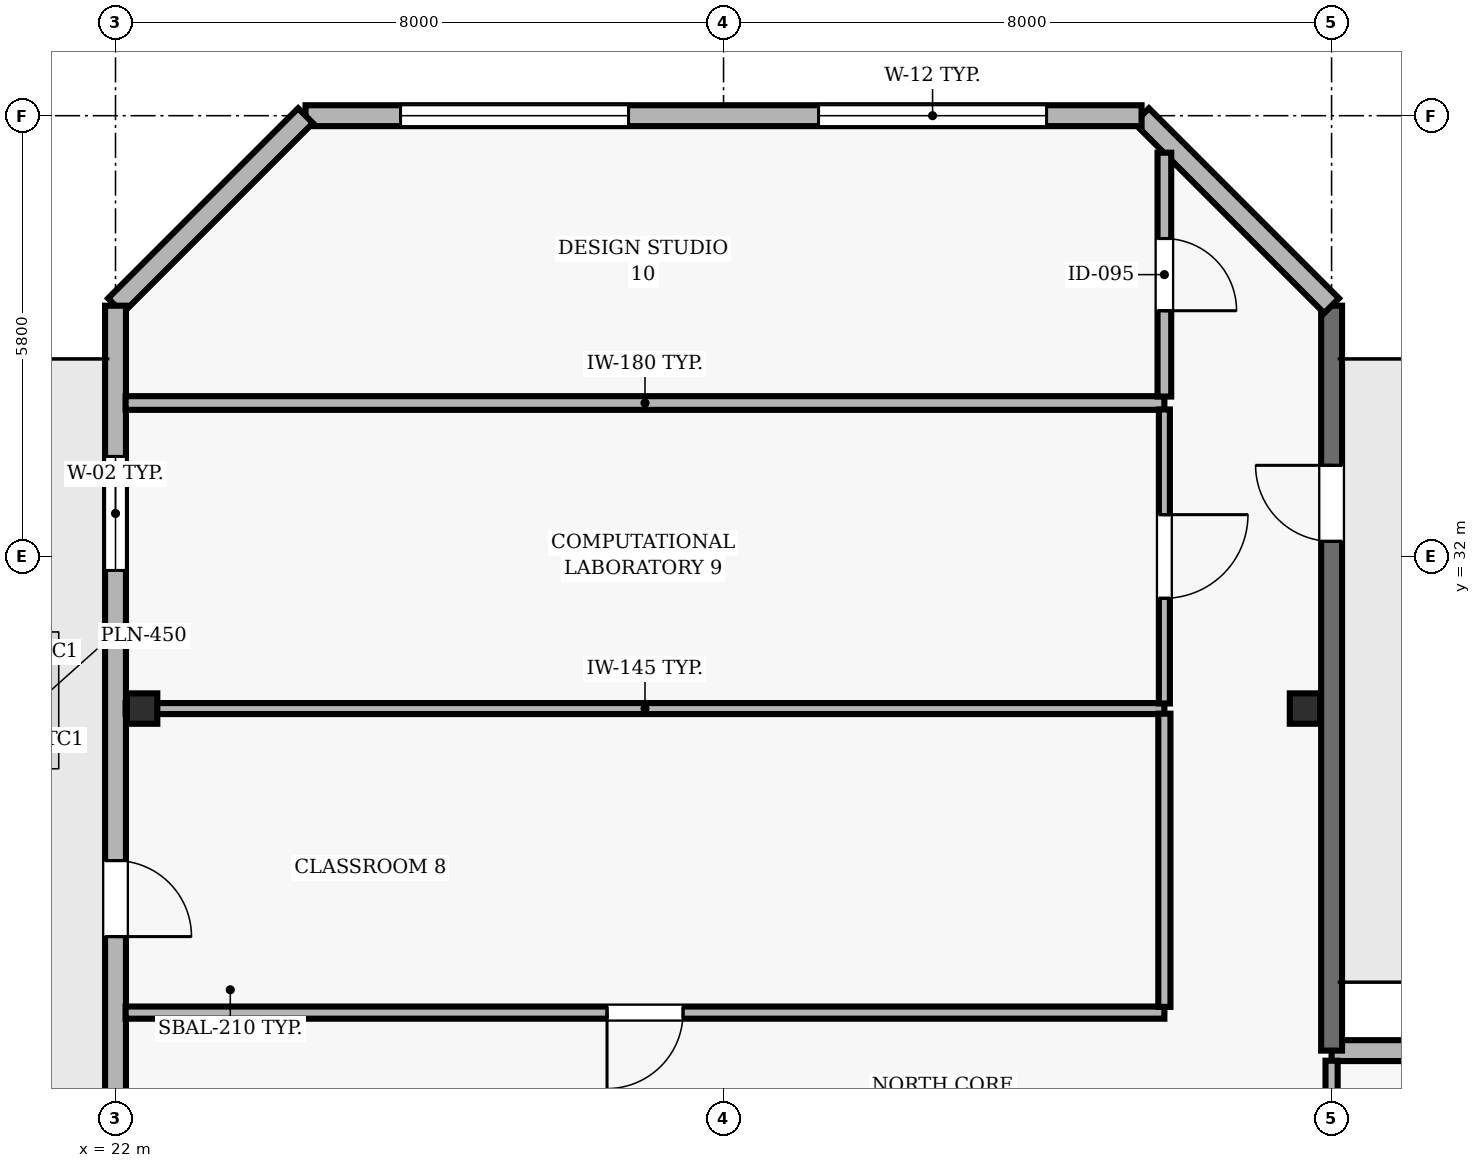
"""IFC4 building model, lengths in metres.
Left out: names, types, materials, properties, quantities, classifications, styles, units other than length and angle.
Written with IfcOpenShell. Run it as: python <this file> out.ifc"""

import sys

from ifc_helpers import new_model, si_unit, direction, frame, frame_2d, origin, origin_2d, place, context, subcontext, project, spatial, rectangle, hollow_rectangle, extrude, element, fill, save


model = new_model("IFC4")
c1 = context("Model", 3, precision=1e-05, world=origin(), true_north=direction((0.0, 1.0)))
c2 = subcontext(c1, "Body", "Model", "MODEL_VIEW")
j1 = project(units=[si_unit("LENGTHUNIT", "METRE"), si_unit("PLANEANGLEUNIT", "RADIAN")], contexts=[c1])
p1 = place(None, origin())
s1 = spatial("IfcSite", under=j1, at=p1, CompositionType="ELEMENT")
p2 = place(p1, origin())
s2 = spatial("IfcBuilding", under=s1, at=p2, CompositionType="ELEMENT")
p3 = place(p2, frame((0.0, 0.0, 252.1)))
s3 = spatial("IfcBuildingStorey", under=s2, at=p3, CompositionType="ELEMENT", Elevation=252.1)
for number, where, z_axis, x_axis in (
    (1, (22.35, 30.0, 0.0), (0.0, 0.0, 1.0), (1.0, 0.0, 0.0)),
    (2, (37.65, 30.0, 0.0), (0.0, 0.0, 1.0), (1.0, 0.0, 0.0)),
):
    element("IfcColumn", number, at=place(p3, frame(where, z_axis=z_axis, x_axis=x_axis)), inside=s3, PredefinedType="COLUMN", context=c2, shape_type="SweptSolid", body=[
        extrude(hollow_rectangle(XDim=0.4, YDim=0.4, WallThickness=0.02, at=origin_2d()), origin(), (0.0, 0.0, 1.0), 3.9),
    ])
p4 = place(p3, frame((43.64, 25.5, 0.0), z_axis=(0.0, 0.0, 1.0), x_axis=(-1.0, 0.0, 0.0)))
e3 = element("IfcWall", 3, at=p4, inside=s3, PredefinedType="SOLIDWALL", context=c2, shape_type="SweptSolid", body=[
    extrude(rectangle(XDim=5.64, YDim=0.275, at=frame_2d((2.82, 0.0))), origin(), (0.0, 0.0, 1.0), 3.69),
])
p5 = place(p4, frame((1.42, 0.0, 0.9)))
e4 = element("IfcOpeningElement", 4, at=p5, cuts=e3, PredefinedType="OPENING", context=c2, shape_type="SweptSolid", body=[
    extrude(rectangle(XDim=2.8, YDim=1.8, at=frame_2d((1.4, 0.9))), frame((0.0, 0.147, 0.0), z_axis=(0.0, -1.0, 0.0), x_axis=(1.0, 0.0, 0.0)), (0.0, 0.0, 1.0), 0.295),
])
p6 = place(p3, frame((38.0, 25.5, 0.0), z_axis=(0.0, 0.0, 1.0), x_axis=(0.0, 1.0, 0.0)))
e5 = element("IfcWall", 5, at=p6, inside=s3, PredefinedType="SOLIDWALL", context=c2, shape_type="SweptSolid", body=[
    extrude(rectangle(XDim=9.8, YDim=0.275, at=frame_2d((4.9, 0.0))), origin(), (0.0, 0.0, 1.0), 3.69),
])
p7 = place(p6, frame((6.7, 0.0, 0.0)))
e6 = element("IfcOpeningElement", 6, at=p7, cuts=e5, PredefinedType="OPENING", context=c2, shape_type="SweptSolid", body=[
    extrude(rectangle(XDim=1.0, YDim=2.2, at=frame_2d((0.5, 1.1))), frame((0.0, 0.147, 0.0), z_axis=(0.0, -1.0, 0.0), x_axis=(1.0, 0.0, 0.0)), (0.0, 0.0, 1.0), 0.295),
])
p8 = place(p3, frame((38.0, 35.3, 0.0), z_axis=(0.0, 0.0, 1.0), x_axis=(-0.707106781187, 0.707106781187, 0.0)))
e7 = element("IfcWall", 7, at=p8, inside=s3, PredefinedType="SOLIDWALL", context=c2, shape_type="SweptSolid", body=[
    extrude(rectangle(XDim=3.536, YDim=0.275, at=frame_2d((1.768, 0.0))), origin(), (0.0, 0.0, 1.0), 3.69),
])
p9 = place(p3, frame((35.5, 37.8, 0.0), z_axis=(0.0, 0.0, 1.0), x_axis=(-1.0, 0.0, 0.0)))
e8 = element("IfcWall", 8, at=p9, inside=s3, PredefinedType="SOLIDWALL", context=c2, shape_type="SweptSolid", body=[
    extrude(rectangle(XDim=11.0, YDim=0.275, at=frame_2d((5.5, 0.0))), origin(), (0.0, 0.0, 1.0), 3.69),
])
p10 = place(p9, frame((1.25, 0.0, 0.9)))
e9 = element("IfcOpeningElement", 9, at=p10, cuts=e8, PredefinedType="OPENING", context=c2, shape_type="SweptSolid", body=[
    extrude(rectangle(XDim=3.0, YDim=2.2, at=frame_2d((1.5, 1.1))), frame((0.0, 0.147, 0.0), z_axis=(0.0, -1.0, 0.0), x_axis=(1.0, 0.0, 0.0)), (0.0, 0.0, 1.0), 0.295),
])
p11 = place(p9, frame((6.75, 0.0, 0.9)))
e10 = element("IfcOpeningElement", 10, at=p11, cuts=e8, PredefinedType="OPENING", context=c2, shape_type="SweptSolid", body=[
    extrude(rectangle(XDim=3.0, YDim=2.2, at=frame_2d((1.5, 1.1))), frame((0.0, 0.147, 0.0), z_axis=(0.0, -1.0, 0.0), x_axis=(1.0, 0.0, 0.0)), (0.0, 0.0, 1.0), 0.295),
])
p12 = place(p3, frame((24.5, 37.8, 0.0), z_axis=(0.0, 0.0, 1.0), x_axis=(-0.707106781187, -0.707106781187, 0.0)))
e11 = element("IfcWall", 11, at=p12, inside=s3, PredefinedType="SOLIDWALL", context=c2, shape_type="SweptSolid", body=[
    extrude(rectangle(XDim=3.536, YDim=0.275, at=frame_2d((1.768, 0.0))), origin(), (0.0, 0.0, 1.0), 3.69),
])
p13 = place(p3, frame((22.0, 35.3, 0.0), z_axis=(0.0, 0.0, 1.0), x_axis=(0.0, -1.0, 0.0)))
e12 = element("IfcWall", 12, at=p13, inside=s3, PredefinedType="SOLIDWALL", context=c2, shape_type="SweptSolid", body=[
    extrude(rectangle(XDim=32.8, YDim=0.275, at=frame_2d((16.4, 0.0))), origin(), (0.0, 0.0, 1.0), 3.69),
])
p14 = place(p13, frame((7.3, 0.0, 0.0)))
e13 = element("IfcOpeningElement", 13, at=p14, cuts=e12, PredefinedType="OPENING", context=c2, shape_type="SweptSolid", body=[
    extrude(rectangle(XDim=1.0, YDim=2.2, at=frame_2d((0.5, 1.1))), frame((0.0, 0.147, 0.0), z_axis=(0.0, -1.0, 0.0), x_axis=(1.0, 0.0, 0.0)), (0.0, 0.0, 1.0), 0.295),
])
p15 = place(p13, frame((1.983, 0.0, 0.9)))
e14 = element("IfcOpeningElement", 14, at=p15, cuts=e12, PredefinedType="OPENING", context=c2, shape_type="SweptSolid", body=[
    extrude(rectangle(XDim=1.5, YDim=1.6, at=frame_2d((0.75, 0.8))), frame((0.0, 0.147, 0.0), z_axis=(0.0, -1.0, 0.0), x_axis=(1.0, 0.0, 0.0)), (0.0, 0.0, 1.0), 0.295),
])
p16 = place(p13, frame((12.917, 0.0, 0.9)))
e15 = element("IfcOpeningElement", 15, at=p16, cuts=e12, PredefinedType="OPENING", context=c2, shape_type="SweptSolid", body=[
    extrude(rectangle(XDim=1.5, YDim=1.6, at=frame_2d((0.75, 0.8))), frame((0.0, 0.147, 0.0), z_axis=(0.0, -1.0, 0.0), x_axis=(1.0, 0.0, 0.0)), (0.0, 0.0, 1.0), 0.295),
])
p17 = place(p13, frame((18.383, 0.0, 0.9)))
e16 = element("IfcOpeningElement", 16, at=p17, cuts=e12, PredefinedType="OPENING", context=c2, shape_type="SweptSolid", body=[
    extrude(rectangle(XDim=1.5, YDim=1.6, at=frame_2d((0.75, 0.8))), frame((0.0, 0.147, 0.0), z_axis=(0.0, -1.0, 0.0), x_axis=(1.0, 0.0, 0.0)), (0.0, 0.0, 1.0), 0.295),
])
p18 = place(p13, frame((23.85, 0.0, 0.9)))
e17 = element("IfcOpeningElement", 17, at=p18, cuts=e12, PredefinedType="OPENING", context=c2, shape_type="SweptSolid", body=[
    extrude(rectangle(XDim=1.5, YDim=1.6, at=frame_2d((0.75, 0.8))), frame((0.0, 0.147, 0.0), z_axis=(0.0, -1.0, 0.0), x_axis=(1.0, 0.0, 0.0)), (0.0, 0.0, 1.0), 0.295),
])
p19 = place(p3, frame((35.8, 26.0, 0.0), z_axis=(0.0, 0.0, 1.0), x_axis=(-1.0, 0.0, 0.0)))
e18 = element("IfcWall", 18, at=p19, inside=s3, PredefinedType="PARTITIONING", context=c2, shape_type="SweptSolid", body=[
    extrude(rectangle(XDim=13.667, YDim=0.16, at=frame_2d((6.833, 0.0))), origin(), (0.0, 0.0, 1.0), 3.69),
])
p20 = place(p19, frame((6.333, 0.0, 0.0)))
e19 = element("IfcOpeningElement", 19, at=p20, cuts=e18, PredefinedType="OPENING", context=c2, shape_type="SweptSolid", body=[
    extrude(rectangle(XDim=1.0, YDim=2.1, at=frame_2d((0.5, 1.05))), frame((0.0, 0.09, 0.0), z_axis=(0.0, -1.0, 0.0), x_axis=(1.0, 0.0, 0.0)), (0.0, 0.0, 1.0), 0.18),
])
p21 = place(p3, frame((35.8, 30.0, 0.0), z_axis=(0.0, 0.0, 1.0), x_axis=(-1.0, 0.0, 0.0)))
e20 = element("IfcWall", 20, at=p21, inside=s3, PredefinedType="PARTITIONING", context=c2, shape_type="SweptSolid", body=[
    extrude(rectangle(XDim=13.667, YDim=0.145, at=frame_2d((6.833, 0.0))), origin(), (0.0, 0.0, 1.0), 3.227),
])
p22 = place(p3, frame((35.8, 34.02, 0.0), z_axis=(0.0, 0.0, 1.0), x_axis=(-1.0, 0.0, 0.0)))
e21 = element("IfcWall", 21, at=p22, inside=s3, PredefinedType="PARTITIONING", context=c2, shape_type="SweptSolid", body=[
    extrude(rectangle(XDim=13.667, YDim=0.18, at=frame_2d((6.833, 0.0))), origin(), (0.0, 0.0, 1.0), 3.69),
])
p23 = place(p3, frame((35.8, 29.933, 0.0), z_axis=(0.0, 0.0, 1.0), x_axis=(0.0, -1.0, 0.0)))
e22 = element("IfcWall", 22, at=p23, inside=s3, PredefinedType="PARTITIONING", context=c2, shape_type="SweptSolid", body=[
    extrude(rectangle(XDim=3.858, YDim=0.16, at=frame_2d((1.929, 0.0))), origin(), (0.0, 0.0, 1.0), 3.69),
])
p24 = place(p3, frame((35.8, 33.935, 0.0), z_axis=(0.0, 0.0, 1.0), x_axis=(0.0, -1.0, 0.0)))
e23 = element("IfcWall", 23, at=p24, inside=s3, PredefinedType="PARTITIONING", context=c2, shape_type="SweptSolid", body=[
    extrude(rectangle(XDim=3.868, YDim=0.145, at=frame_2d((1.934, 0.0))), origin(), (0.0, 0.0, 1.0), 3.69),
])
p25 = place(p24, frame((1.384, 0.0, 0.0)))
e24 = element("IfcOpeningElement", 24, at=p25, cuts=e23, PredefinedType="OPENING", context=c2, shape_type="SweptSolid", body=[
    extrude(rectangle(XDim=1.1, YDim=2.15, at=frame_2d((0.55, 1.075))), frame((0.0, 0.083, 0.0), z_axis=(0.0, -1.0, 0.0), x_axis=(1.0, 0.0, 0.0)), (0.0, 0.0, 1.0), 0.165),
])
p26 = place(p3, frame((35.8, 37.313, 0.0), z_axis=(0.0, 0.0, 1.0), x_axis=(0.0, -1.0, 0.0)))
e25 = element("IfcWall", 25, at=p26, inside=s3, PredefinedType="PARTITIONING", context=c2, shape_type="SweptSolid", body=[
    extrude(rectangle(XDim=3.208, YDim=0.18, at=frame_2d((1.604, 0.0))), origin(), (0.0, 0.0, 1.0), 3.69),
])
p27 = place(p26, frame((1.129, 0.0, 0.0)))
e26 = element("IfcOpeningElement", 26, at=p27, cuts=e25, PredefinedType="OPENING", context=c2, shape_type="SweptSolid", body=[
    extrude(rectangle(XDim=0.95, YDim=2.1, at=frame_2d((0.475, 1.05))), frame((0.0, 0.1, 0.0), z_axis=(0.0, -1.0, 0.0), x_axis=(1.0, 0.0, 0.0)), (0.0, 0.0, 1.0), 0.2),
])
p28 = place(p3, frame((38.0, 23.85, 0.0), z_axis=(0.0, 0.0, 1.0), x_axis=(0.0, 1.0, 0.0)))
e27 = element("IfcWall", 27, at=p28, inside=s3, PredefinedType="PARTITIONING", context=c2, shape_type="SweptSolid", body=[
    extrude(rectangle(XDim=1.517, YDim=0.16, at=frame_2d((0.758, 0.0))), origin(), (0.0, 0.0, 1.0), 3.227),
])
p29 = place(p7, origin())
e28 = element("IfcDoor", 28, at=p29, inside=s3, OperationType="SINGLE_SWING_RIGHT", PredefinedType="DOOR", context=c2, shape_type="SweptSolid", body=[
    extrude(rectangle(XDim=1.0, YDim=2.2, at=frame_2d((0.5, 1.1))), frame((0.0, 0.025, 0.0), z_axis=(0.0, -1.0, 0.0), x_axis=(1.0, 0.0, 0.0)), (0.0, 0.0, 1.0), 0.05),
])
fill(e6, e28)
p30 = place(p10, origin())
e29 = element("IfcWindow", 29, at=p30, inside=s3, PartitioningType="SINGLE_PANEL", PredefinedType="WINDOW", context=c2, shape_type="SweptSolid", body=[
    extrude(rectangle(XDim=3.0, YDim=2.2, at=frame_2d((1.5, 1.1))), frame((0.0, 0.03, 0.0), z_axis=(0.0, -1.0, 0.0), x_axis=(1.0, 0.0, 0.0)), (0.0, 0.0, 1.0), 0.06),
])
fill(e9, e29)
p31 = place(p11, origin())
e30 = element("IfcWindow", 30, at=p31, inside=s3, PartitioningType="SINGLE_PANEL", PredefinedType="WINDOW", context=c2, shape_type="SweptSolid", body=[
    extrude(rectangle(XDim=3.0, YDim=2.2, at=frame_2d((1.5, 1.1))), frame((0.0, 0.03, 0.0), z_axis=(0.0, -1.0, 0.0), x_axis=(1.0, 0.0, 0.0)), (0.0, 0.0, 1.0), 0.06),
])
fill(e10, e30)
p32 = place(p14, origin())
e31 = element("IfcDoor", 31, at=p32, inside=s3, OperationType="SINGLE_SWING_RIGHT", PredefinedType="DOOR", context=c2, shape_type="SweptSolid", body=[
    extrude(rectangle(XDim=1.0, YDim=2.2, at=frame_2d((0.5, 1.1))), frame((0.0, 0.025, 0.0), z_axis=(0.0, -1.0, 0.0), x_axis=(1.0, 0.0, 0.0)), (0.0, 0.0, 1.0), 0.05),
])
fill(e13, e31)
p33 = place(p15, origin())
e32 = element("IfcWindow", 32, at=p33, inside=s3, PartitioningType="SINGLE_PANEL", PredefinedType="WINDOW", context=c2, shape_type="SweptSolid", body=[
    extrude(rectangle(XDim=1.5, YDim=1.6, at=frame_2d((0.75, 0.8))), frame((0.0, 0.03, 0.0), z_axis=(0.0, -1.0, 0.0), x_axis=(1.0, 0.0, 0.0)), (0.0, 0.0, 1.0), 0.06),
])
fill(e14, e32)
p34 = place(p20, origin())
e33 = element("IfcDoor", 33, at=p34, inside=s3, OperationType="SINGLE_SWING_RIGHT", PredefinedType="DOOR", context=c2, shape_type="SweptSolid", body=[
    extrude(rectangle(XDim=1.0, YDim=2.1, at=frame_2d((0.5, 1.05))), frame((0.0, 0.025, 0.0), z_axis=(0.0, -1.0, 0.0), x_axis=(1.0, 0.0, 0.0)), (0.0, 0.0, 1.0), 0.05),
])
fill(e19, e33)
p35 = place(p25, origin())
e34 = element("IfcDoor", 34, at=p35, inside=s3, OperationType="SINGLE_SWING_LEFT", PredefinedType="DOOR", context=c2, shape_type="SweptSolid", body=[
    extrude(rectangle(XDim=1.1, YDim=2.15, at=frame_2d((0.55, 1.075))), frame((0.0, 0.025, 0.0), z_axis=(0.0, -1.0, 0.0), x_axis=(1.0, 0.0, 0.0)), (0.0, 0.0, 1.0), 0.05),
])
fill(e24, e34)
p36 = place(p27, origin())
e35 = element("IfcDoor", 35, at=p36, inside=s3, OperationType="SINGLE_SWING_RIGHT", PredefinedType="DOOR", context=c2, shape_type="SweptSolid", body=[
    extrude(rectangle(XDim=0.95, YDim=2.1, at=frame_2d((0.475, 1.05))), frame((0.0, 0.025, 0.0), z_axis=(0.0, -1.0, 0.0), x_axis=(1.0, 0.0, 0.0)), (0.0, 0.0, 1.0), 0.05),
])
fill(e26, e35)
save(model, sys.argv[1])
